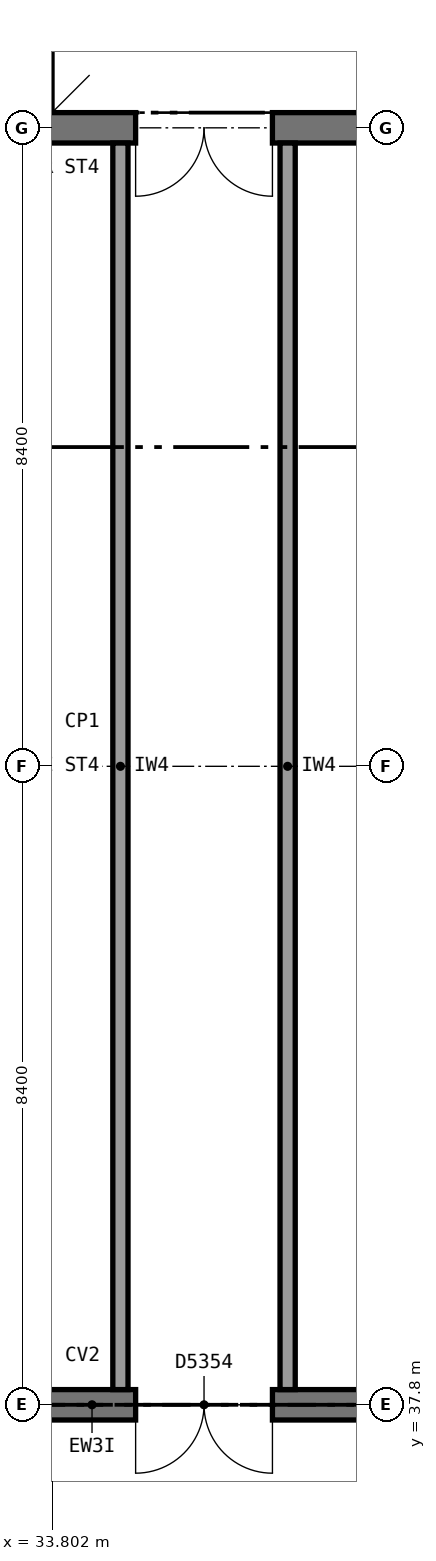
"""IFC4 building model, lengths in metres.
Left out: names, types, materials, properties, quantities, classifications, styles, units other than length and angle.
Written with IfcOpenShell. Run it as: python <this file> out.ifc"""

import sys

from ifc_helpers import new_model, si_unit, direction, frame, frame_2d, origin, place, context, subcontext, project, spatial, rectangle, extrude, element, fill, save


model = new_model("IFC4")
c1 = context("Model", 3, precision=1e-05, world=origin(), true_north=direction((0.0, 1.0)))
c2 = subcontext(c1, "Body", "Model", "MODEL_VIEW")
j1 = project(units=[si_unit("LENGTHUNIT", "METRE"), si_unit("PLANEANGLEUNIT", "RADIAN")], contexts=[c1])
p1 = place(None, origin())
s1 = spatial("IfcSite", under=j1, at=p1, CompositionType="ELEMENT")
p2 = place(p1, origin())
s2 = spatial("IfcBuilding", under=s1, at=p2, CompositionType="ELEMENT")
p3 = place(p2, origin())
s3 = spatial("IfcBuildingStorey", under=s2, at=p3, CompositionType="ELEMENT", Elevation=0.0)
p4 = place(p3, frame((33.75, 54.6, 0.0), z_axis=(0.0, 0.0, 1.0), x_axis=(1.0, 0.0, 0.0)))
e1 = element("IfcWall", 1, at=p4, inside=s3, PredefinedType="SHEAR", context=c2, shape_type="SweptSolid", body=[
    extrude(rectangle(XDim=8.1, YDim=0.4, at=frame_2d((4.05, 0.0))), origin(), (0.0, 0.0, 1.0), 5.85),
])
p5 = place(p4, frame((5.3, 0.0, 0.0)))
e2 = element("IfcOpeningElement", 2, at=p5, cuts=e1, PredefinedType="OPENING", context=c2, shape_type="SweptSolid", body=[
    extrude(rectangle(XDim=1.8, YDim=2.1, at=frame_2d((0.9, 1.05))), frame((0.0, 0.21, 0.0), z_axis=(0.0, -1.0, 0.0), x_axis=(1.0, 0.0, 0.0)), (0.0, 0.0, 1.0), 0.42),
])
p6 = place(p4, frame((1.15, 0.0, 0.0)))
e3 = element("IfcOpeningElement", 3, at=p6, cuts=e1, PredefinedType="OPENING", context=c2, shape_type="SweptSolid", body=[
    extrude(rectangle(XDim=1.8, YDim=2.1, at=frame_2d((0.9, 1.05))), frame((0.0, 0.21, 0.0), z_axis=(0.0, -1.0, 0.0), x_axis=(1.0, 0.0, 0.0)), (0.0, 0.0, 1.0), 0.42),
])
p7 = place(p3, frame((33.753, 37.8, 0.0), z_axis=(0.0, 0.0, 1.0), x_axis=(1.0, 0.0, 0.0)))
e4 = element("IfcWall", 4, at=p7, inside=s3, PredefinedType="STANDARD", context=c2, shape_type="SweptSolid", body=[
    extrude(rectangle(XDim=8.095, YDim=0.4, at=frame_2d((4.047, 0.0))), origin(), (0.0, 0.0, 1.0), 5.85),
])
p8 = place(p7, frame((1.147, 0.0, 0.0)))
e5 = element("IfcOpeningElement", 5, at=p8, cuts=e4, PredefinedType="OPENING", context=c2, shape_type="SweptSolid", body=[
    extrude(rectangle(XDim=1.8, YDim=2.1, at=frame_2d((0.9, 1.05))), frame((0.0, 0.21, 0.0), z_axis=(0.0, -1.0, 0.0), x_axis=(1.0, 0.0, 0.0)), (0.0, 0.0, 1.0), 0.42),
])
for number, where, z_axis, x_axis in (
    (6, (34.7, 54.4, 0.0), (0.0, 0.0, 1.0), (0.0, -1.0, 0.0)),
    (7, (36.9, 54.4, 0.0), (0.0, 0.0, 1.0), (0.0, -1.0, 0.0)),
):
    element("IfcWall", number, at=place(p3, frame(where, z_axis=z_axis, x_axis=x_axis)), inside=s3, PredefinedType="PARTITIONING", context=c2, shape_type="SweptSolid", body=[
        extrude(rectangle(XDim=16.4, YDim=0.2, at=frame_2d((8.2, 0.0))), origin(), (0.0, 0.0, 1.0), 5.85),
    ])
p9 = place(p6, frame((1.8, 0.0, 0.0), z_axis=(0.0, 0.0, 1.0), x_axis=(-1.0, 0.0, 0.0)))
e8 = element("IfcDoor", 8, at=p9, inside=s3, OperationType="DOUBLE_DOOR_SINGLE_SWING", PredefinedType="DOOR", context=c2, shape_type="SweptSolid", body=[
    extrude(rectangle(XDim=1.8, YDim=2.1, at=frame_2d((0.9, 1.05))), frame((0.0, 0.025, 0.0), z_axis=(0.0, -1.0, 0.0), x_axis=(1.0, 0.0, 0.0)), (0.0, 0.0, 1.0), 0.05),
])
fill(e3, e8)
p10 = place(p8, frame((1.8, 0.0, 0.0), z_axis=(0.0, 0.0, 1.0), x_axis=(-1.0, 0.0, 0.0)))
e9 = element("IfcDoor", 9, at=p10, inside=s3, OperationType="DOUBLE_DOOR_SINGLE_SWING", PredefinedType="DOOR", context=c2, shape_type="SweptSolid", body=[
    extrude(rectangle(XDim=1.8, YDim=2.1, at=frame_2d((0.9, 1.05))), frame((0.0, 0.025, 0.0), z_axis=(0.0, -1.0, 0.0), x_axis=(1.0, 0.0, 0.0)), (0.0, 0.0, 1.0), 0.05),
])
fill(e5, e9)
save(model, sys.argv[1])
